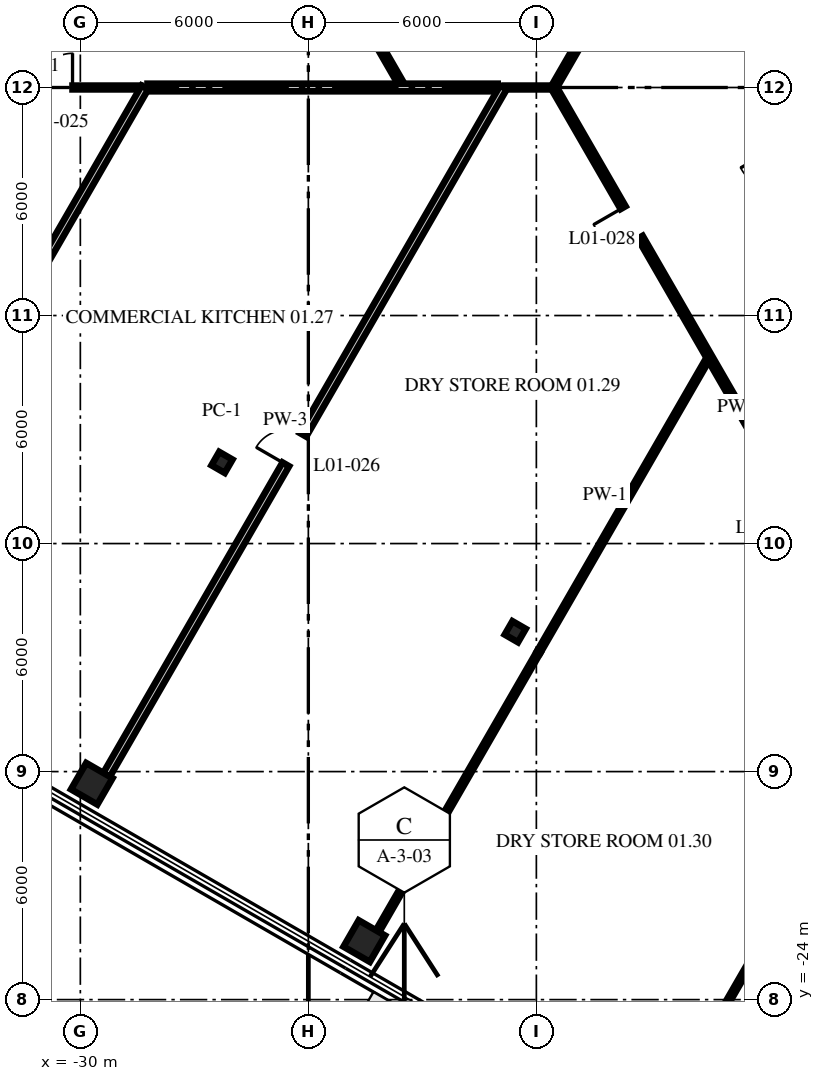
"""IFC4 building model, lengths in metres.
Left out: names, types, materials, properties, quantities, classifications, styles, units other than length and angle.
Written with IfcOpenShell. Run it as: python <this file> out.ifc"""

import sys

from ifc_helpers import new_model, si_unit, direction, frame, frame_2d, origin, origin_2d, place, context, subcontext, project, spatial, rectangle, i_section, extrude, source, transform, mapped, element, fill, save


model = new_model("IFC4")
c1 = context("Model", 3, precision=1e-05, world=origin(), true_north=direction((0.0, 1.0)))
c2 = subcontext(c1, "Body", "Model", "MODEL_VIEW")
j1 = project(units=[si_unit("LENGTHUNIT", "METRE"), si_unit("PLANEANGLEUNIT", "RADIAN")], contexts=[c1])
p1 = place(None, origin())
s1 = spatial("IfcSite", under=j1, at=p1, CompositionType="ELEMENT")
p2 = place(p1, origin())
s2 = spatial("IfcBuilding", under=s1, at=p2, CompositionType="ELEMENT")
p3 = place(p2, frame((0.0, 0.0, 7.0)))
s3 = spatial("IfcBuildingStorey", under=s2, at=p3, CompositionType="ELEMENT", Elevation=7.0)
m1 = source(origin(), c2, "Body", "SweptSolid", [
    extrude(i_section(OverallWidth=0.404, OverallDepth=0.406, WebThickness=0.027, FlangeThickness=0.044, at=origin_2d()), origin(), (0.0, 0.0, 1.0), 4.5),
])
for number, where, z_axis, x_axis in (
    (1, (-26.272, -9.865, 0.0), (0.0, 0.0, 1.0), (0.866, -0.5, 0.0)),
    (2, (-18.556, -14.32, 0.0), (0.0, 0.0, 1.0), (0.866, -0.5, 0.0)),
):
    element("IfcColumn", number, at=place(p3, frame(where, z_axis=z_axis, x_axis=x_axis)), inside=s3, PredefinedType="COLUMN", context=c2, shape_type="MappedRepresentation", body=[
        mapped(m1, transform((0.0, 0.0, 0.0), scale=1.0)),
    ])
m2 = source(origin(), c2, "Body", "SweptSolid", [
    extrude(rectangle(XDim=0.8, YDim=0.8, at=origin_2d()), origin(), (0.0, 0.0, 1.0), 4.5),
])
for number, where, z_axis, x_axis in (
    (3, (-29.699, -18.32, 0.0), (0.0, 0.0, 1.0), (0.866, -0.5, 0.0)),
    (4, (-22.528, -22.46, 0.0), (0.0, 0.0, 1.0), (0.866, -0.5, 0.0)),
):
    element("IfcColumn", number, at=place(p3, frame(where, z_axis=z_axis, x_axis=x_axis)), inside=s3, PredefinedType="COLUMN", context=c2, shape_type="MappedRepresentation", body=[
        mapped(m2, transform((0.0, 0.0, 0.0), scale=1.0)),
    ])
p4 = place(p3, frame((-31.817, 17.864, 0.0), z_axis=(0.0, 0.0, 1.0), x_axis=(0.500001119364, -0.866024757518, 0.0)))
e5 = element("IfcWall", 5, at=p4, inside=s3, PredefinedType="PARTITIONING", context=c2, shape_type="SweptSolid", body=[
    extrude(rectangle(XDim=20.628, YDim=0.15, at=frame_2d((10.314, 0.0))), origin(), (0.0, 0.0, 1.0), 4.3),
])
p5 = place(p4, frame((10.175, 0.0, 0.0)))
e6 = element("IfcOpeningElement", 6, at=p5, cuts=e5, PredefinedType="OPENING", context=c2, shape_type="SweptSolid", body=[
    extrude(rectangle(XDim=0.9, YDim=2.1, at=frame_2d((0.45, 1.05))), frame((0.0, 0.085, 0.0), z_axis=(0.0, -1.0, 0.0), x_axis=(1.0, 0.0, 0.0)), (0.0, 0.0, 1.0), 0.17),
])
p6 = place(p3, frame((-17.542, 0.0, 0.0), z_axis=(0.0, 0.0, 1.0), x_axis=(0.499996320153, -0.866027528335, 0.0)))
e7 = element("IfcWall", 7, at=p6, inside=s3, PredefinedType="PARTITIONING", context=c2, shape_type="SweptSolid", body=[
    extrude(rectangle(XDim=17.543, YDim=0.15, at=frame_2d((8.771, 0.0))), origin(), (0.0, 0.0, 1.0), 4.3),
])
p7 = place(p6, frame((3.65, 0.0, 0.0)))
e8 = element("IfcOpeningElement", 8, at=p7, cuts=e7, PredefinedType="OPENING", context=c2, shape_type="SweptSolid", body=[
    extrude(rectangle(XDim=0.9, YDim=2.1, at=frame_2d((0.45, 1.05))), frame((0.0, 0.085, 0.0), z_axis=(0.0, -1.0, 0.0), x_axis=(1.0, 0.0, 0.0)), (0.0, 0.0, 1.0), 0.17),
])
p8 = place(p6, frame((12.43, 0.0, 0.0)))
e9 = element("IfcOpeningElement", 9, at=p8, cuts=e7, PredefinedType="OPENING", context=c2, shape_type="SweptSolid", body=[
    extrude(rectangle(XDim=0.9, YDim=2.1, at=frame_2d((0.45, 1.05))), frame((0.0, 0.085, 0.0), z_axis=(0.0, -1.0, 0.0), x_axis=(1.0, 0.0, 0.0)), (0.0, 0.0, 1.0), 0.17),
])
p9 = place(p3, frame((-33.795, 0.0, 0.0), z_axis=(0.0, 0.0, 1.0), x_axis=(1.0, 0.0, 0.0)))
e10 = element("IfcWall", 10, at=p9, inside=s3, PredefinedType="PARTITIONING", context=c2, shape_type="SweptSolid", body=[
    extrude(rectangle(XDim=5.374, YDim=0.1, at=frame_2d((2.687, 0.0))), origin(), (0.0, 0.0, 1.0), 4.3),
])
p10 = place(p9, frame((2.69, 0.0, 0.0)))
e11 = element("IfcOpeningElement", 11, at=p10, cuts=e10, PredefinedType="OPENING", context=c2, shape_type="SweptSolid", body=[
    extrude(rectangle(XDim=0.9, YDim=2.1, at=frame_2d((0.45, 1.05))), frame((0.0, 0.06, 0.0), z_axis=(0.0, -1.0, 0.0), x_axis=(1.0, 0.0, 0.0)), (0.0, 0.0, 1.0), 0.12),
])
p11 = place(p3, frame((-28.232, 0.0, 0.0), z_axis=(0.0, 0.0, 1.0), x_axis=(1.0, 0.0, 0.0)))
e12 = element("IfcWall", 12, at=p11, inside=s3, PredefinedType="PARTITIONING", context=c2, shape_type="SweptSolid", body=[
    extrude(rectangle(XDim=9.214, YDim=0.2, at=frame_2d((4.607, 0.0))), origin(), (0.0, 0.0, 1.0), 4.3),
])
p12 = place(p3, frame((-18.828, 0.0, 0.0), z_axis=(0.0, 0.0, 1.0), x_axis=(1.0, 0.0, 0.0)))
e13 = element("IfcWall", 13, at=p12, inside=s3, PredefinedType="PARTITIONING", context=c2, shape_type="SweptSolid", body=[
    extrude(rectangle(XDim=1.245, YDim=0.1, at=frame_2d((0.623, 0.0))), origin(), (0.0, 0.0, 1.0), 4.3),
])
m3 = source(origin(), c2, "Body", "SweptSolid", [
    extrude(rectangle(XDim=14.21, YDim=0.1, at=frame_2d((7.105, 0.0))), origin(), (0.0, 0.0, 1.0), 4.3),
])
p13 = place(p3, frame((-14.995, -27.576, 0.0), z_axis=(0.0, 0.0, 1.0), x_axis=(0.500008500586, 0.866020495913, 0.0)))
e14 = element("IfcWall", 14, at=p13, inside=s3, PredefinedType="PARTITIONING", context=c2, shape_type="MappedRepresentation", body=[
    mapped(m3, transform((0.0, 0.0, 0.0), scale=1.0)),
])
m4 = source(origin(), c2, "Body", "SweptSolid", [
    extrude(rectangle(XDim=8.49, YDim=0.1, at=frame_2d((4.245, 0.0))), origin(), (0.0, 0.0, 1.0), 3.528),
])
p14 = place(p3, frame((-22.184, -22.208, 0.0), z_axis=(0.0, 0.0, 1.0), x_axis=(0.500007862672, 0.866020864221, 0.0)))
e15 = element("IfcWall", 15, at=p14, inside=s3, PredefinedType="PARTITIONING", context=c2, shape_type="MappedRepresentation", body=[
    mapped(m4, transform((0.0, 0.0, 0.0), scale=1.0)),
])
p15 = place(p3, frame((-17.939, -14.855, 0.0), z_axis=(0.0, 0.0, 1.0), x_axis=(0.500002384187, 0.866024027269, 0.0)))
e16 = element("IfcWall", 16, at=p15, inside=s3, PredefinedType="PARTITIONING", context=c2, shape_type="SweptSolid", body=[
    extrude(rectangle(XDim=8.883, YDim=0.1, at=frame_2d((4.442, 0.0))), origin(), (0.0, 0.0, 1.0), 4.3),
])
p16 = place(p3, frame((-17.518, 0.044, 0.0), z_axis=(0.0, 0.0, 1.0), x_axis=(0.500011872673, 0.866018548985, 0.0)))
e17 = element("IfcWall", 17, at=p16, inside=s3, PredefinedType="PARTITIONING", context=c2, shape_type="SweptSolid", body=[
    extrude(rectangle(XDim=17.452, YDim=0.15, at=frame_2d((8.726, 0.0))), origin(), (0.0, 0.0, 1.0), 4.3),
])
p17 = place(p16, frame((11.417, 0.0, 0.0)))
e18 = element("IfcOpeningElement", 18, at=p17, cuts=e17, PredefinedType="OPENING", context=c2, shape_type="SweptSolid", body=[
    extrude(rectangle(XDim=1.8, YDim=2.4, at=frame_2d((0.9, 1.2))), frame((0.0, 0.085, 0.0), z_axis=(0.0, -1.0, 0.0), x_axis=(1.0, 0.0, 0.0)), (0.0, 0.0, 1.0), 0.17),
])
p18 = place(p16, frame((2.006, 0.0, 0.0)))
e19 = element("IfcOpeningElement", 19, at=p18, cuts=e17, PredefinedType="OPENING", context=c2, shape_type="SweptSolid", body=[
    extrude(rectangle(XDim=0.9, YDim=2.1, at=frame_2d((0.45, 1.05))), frame((0.0, 0.085, 0.0), z_axis=(0.0, -1.0, 0.0), x_axis=(1.0, 0.0, 0.0)), (0.0, 0.0, 1.0), 0.17),
])
p19 = place(p16, frame((6.108, 0.0, 0.0)))
e20 = element("IfcOpeningElement", 20, at=p19, cuts=e17, PredefinedType="OPENING", context=c2, shape_type="SweptSolid", body=[
    extrude(rectangle(XDim=0.9, YDim=2.1, at=frame_2d((0.45, 1.05))), frame((0.0, 0.085, 0.0), z_axis=(0.0, -1.0, 0.0), x_axis=(1.0, 0.0, 0.0)), (0.0, 0.0, 1.0), 0.17),
])
p20 = place(p3, frame((-29.313, -18.092, 0.0), z_axis=(0.0, 0.0, 1.0), x_axis=(0.49999895657, 0.866026006208, 0.0)))
e21 = element("IfcWall", 21, at=p20, inside=s3, PredefinedType="PARTITIONING", context=c2, shape_type="SweptSolid", body=[
    extrude(rectangle(XDim=20.891, YDim=0.2, at=frame_2d((10.446, 0.0))), origin(), (0.0, 0.0, 1.0), 4.3),
])
p21 = place(p20, frame((9.441, 0.0, 0.0)))
e22 = element("IfcOpeningElement", 22, at=p21, cuts=e21, PredefinedType="OPENING", context=c2, shape_type="SweptSolid", body=[
    extrude(rectangle(XDim=0.9, YDim=2.1, at=frame_2d((0.45, 1.05))), frame((0.0, 0.11, 0.0), z_axis=(0.0, -1.0, 0.0), x_axis=(1.0, 0.0, 0.0)), (0.0, 0.0, 1.0), 0.22),
])
p22 = place(p3, frame((-36.389, -14.007, 0.0), z_axis=(0.0, 0.0, 1.0), x_axis=(0.500001196103, 0.866024713213, 0.0)))
e23 = element("IfcWall", 23, at=p22, inside=s3, PredefinedType="PARTITIONING", context=c2, shape_type="SweptSolid", body=[
    extrude(rectangle(XDim=16.174, YDim=0.2, at=frame_2d((8.087, 0.0))), origin(), (0.0, 0.0, 1.0), 4.3),
])
p23 = place(p10, origin())
e24 = element("IfcDoor", 24, at=p23, inside=s3, OperationType="SINGLE_SWING_LEFT", PredefinedType="DOOR", context=c2, shape_type="SweptSolid", body=[
    extrude(rectangle(XDim=0.9, YDim=2.1, at=frame_2d((0.45, 1.05))), frame((0.0, 0.025, 0.0), z_axis=(0.0, -1.0, 0.0), x_axis=(1.0, 0.0, 0.0)), (0.0, 0.0, 1.0), 0.05),
])
fill(e11, e24)
p24 = place(p21, origin())
e25 = element("IfcDoor", 25, at=p24, inside=s3, OperationType="SINGLE_SWING_LEFT", PredefinedType="DOOR", context=c2, shape_type="SweptSolid", body=[
    extrude(rectangle(XDim=0.9, YDim=2.1, at=frame_2d((0.45, 1.05))), frame((0.0, 0.025, 0.0), z_axis=(0.0, -1.0, 0.0), x_axis=(1.0, 0.0, 0.0)), (0.0, 0.0, 1.0), 0.05),
])
fill(e22, e25)
p25 = place(p7, origin())
e26 = element("IfcDoor", 26, at=p25, inside=s3, OperationType="SINGLE_SWING_RIGHT", PredefinedType="DOOR", context=c2, shape_type="SweptSolid", body=[
    extrude(rectangle(XDim=0.9, YDim=2.1, at=frame_2d((0.45, 1.05))), frame((0.0, 0.025, 0.0), z_axis=(0.0, -1.0, 0.0), x_axis=(1.0, 0.0, 0.0)), (0.0, 0.0, 1.0), 0.05),
])
fill(e8, e26)
save(model, sys.argv[1])
